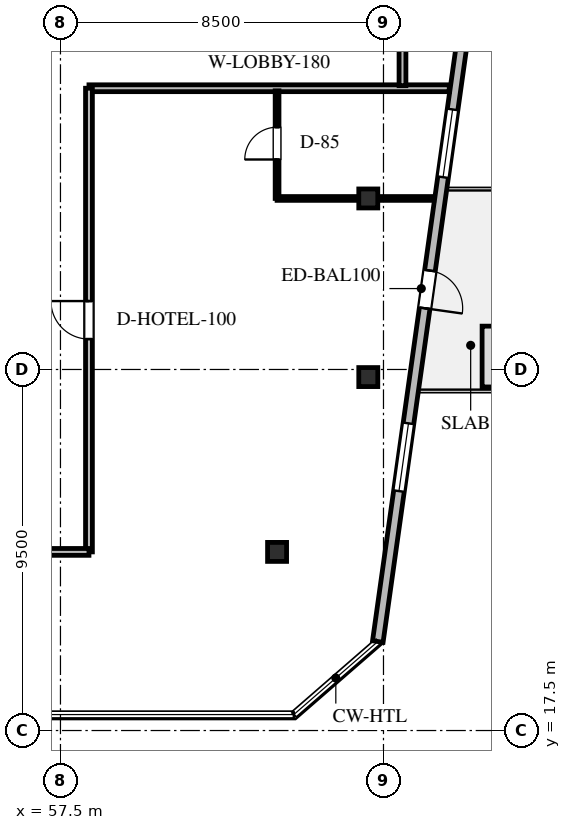
"""IFC4 building model, lengths in metres.
Left out: names, types, materials, properties, quantities, classifications, styles, units other than length and angle.
Written with IfcOpenShell. Run it as: python <this file> out.ifc"""

import sys

from ifc_helpers import new_model, si_unit, direction, frame, frame_2d, origin, origin_2d, place, context, subcontext, project, spatial, rectangle, hollow_rectangle, extrude, element, fill, save


model = new_model("IFC4")
c1 = context("Model", 3, precision=1e-05, world=origin(), true_north=direction((0.0, 1.0)))
c2 = subcontext(c1, "Body", "Model", "MODEL_VIEW")
j1 = project(units=[si_unit("LENGTHUNIT", "METRE"), si_unit("PLANEANGLEUNIT", "RADIAN")], contexts=[c1])
p1 = place(None, origin())
s1 = spatial("IfcSite", under=j1, at=p1, CompositionType="ELEMENT")
p2 = place(p1, origin())
s2 = spatial("IfcBuilding", under=s1, at=p2, CompositionType="ELEMENT")
p3 = place(p2, frame((0.0, 0.0, 249.0)))
s3 = spatial("IfcBuildingStorey", under=s2, at=p3, CompositionType="ELEMENT", Elevation=249.0)
for number, where, z_axis, x_axis in (
    (1, (65.6, 31.5, 0.0), (0.0, 0.0, 1.0), (1.0, 0.0, 0.0)),
    (2, (65.6, 26.8, 0.0), (0.0, 0.0, 1.0), (1.0, 0.0, 0.0)),
    (3, (63.2, 22.2, 0.0), (0.0, 0.0, 1.0), (1.0, 0.0, 0.0)),
):
    element("IfcColumn", number, at=place(p3, frame(where, z_axis=z_axis, x_axis=x_axis)), inside=s3, PredefinedType="COLUMN", context=c2, shape_type="SweptSolid", body=[
        extrude(hollow_rectangle(XDim=0.5, YDim=0.5, WallThickness=0.02, at=origin_2d()), origin(), (0.0, 0.0, 1.0), 3.6),
    ])
p4 = place(p3, frame((68.375, 37.8, 0.0), z_axis=(0.0, 0.0, 1.0), x_axis=(-0.13917438523, -0.990267888248, 0.0)))
e4 = element("IfcWall", 4, at=p4, inside=s3, PredefinedType="STANDARD", context=c2, shape_type="SweptSolid", body=[
    extrude(rectangle(XDim=18.135, YDim=0.28, at=frame_2d((9.067, 0.0))), origin(), (0.0, 0.0, 1.0), 3.36),
])
p5 = place(p4, frame((8.279, 0.0, 0.0)))
e5 = element("IfcOpeningElement", 5, at=p5, cuts=e4, PredefinedType="OPENING", context=c2, shape_type="SweptSolid", body=[
    extrude(rectangle(XDim=1.0, YDim=2.15, at=frame_2d((0.5, 1.075))), frame((0.0, 0.15, 0.0), z_axis=(0.0, -1.0, 0.0), x_axis=(1.0, 0.0, 0.0)), (0.0, 0.0, 1.0), 0.3),
])
p6 = place(p4, frame((3.997, 0.0, 0.65)))
e6 = element("IfcOpeningElement", 6, at=p6, cuts=e4, PredefinedType="OPENING", context=c2, shape_type="SweptSolid", body=[
    extrude(rectangle(XDim=1.8, YDim=2.1, at=frame_2d((0.9, 1.05))), frame((0.0, 0.15, 0.0), z_axis=(0.0, -1.0, 0.0), x_axis=(1.0, 0.0, 0.0)), (0.0, 0.0, 1.0), 0.3),
])
p7 = place(p4, frame((12.338, 0.0, 0.65)))
e7 = element("IfcOpeningElement", 7, at=p7, cuts=e4, PredefinedType="OPENING", context=c2, shape_type="SweptSolid", body=[
    extrude(rectangle(XDim=1.8, YDim=2.1, at=frame_2d((0.9, 1.05))), frame((0.0, 0.15, 0.0), z_axis=(0.0, -1.0, 0.0), x_axis=(1.0, 0.0, 0.0)), (0.0, 0.0, 1.0), 0.3),
])
p8 = place(p3, frame((58.25, 34.4, 0.0), z_axis=(0.0, 0.0, 1.0), x_axis=(1.0, 0.0, 0.0)))
e8 = element("IfcWall", 8, at=p8, inside=s3, PredefinedType="STANDARD", context=c2, shape_type="SweptSolid", body=[
    extrude(rectangle(XDim=9.48, YDim=0.18, at=frame_2d((4.74, 0.0))), origin(), (0.0, 0.0, 1.0), 3.36),
])
p9 = place(p3, frame((66.5, 34.468, 0.0), z_axis=(0.0, 0.0, 1.0), x_axis=(0.0, 1.0, 0.0)))
e9 = element("IfcWall", 9, at=p9, inside=s3, PredefinedType="STANDARD", context=c2, shape_type="SweptSolid", body=[
    extrude(rectangle(XDim=3.582, YDim=0.18, at=frame_2d((1.791, 0.0))), origin(), (0.0, 0.0, 1.0), 2.664),
])
p10 = place(p3, frame((58.25, 22.2, 0.0), z_axis=(0.0, 0.0, 1.0), x_axis=(0.0, 1.0, 0.0)))
e10 = element("IfcWall", 10, at=p10, inside=s3, PredefinedType="STANDARD", context=c2, shape_type="SweptSolid", body=[
    extrude(rectangle(XDim=12.2, YDim=0.18, at=frame_2d((6.1, 0.0))), origin(), (0.0, 0.0, 1.0), 2.664),
])
p11 = place(p10, frame((5.6, 0.0, 0.0)))
e11 = element("IfcOpeningElement", 11, at=p11, cuts=e10, PredefinedType="OPENING", context=c2, shape_type="SweptSolid", body=[
    extrude(rectangle(XDim=1.0, YDim=2.15, at=frame_2d((0.5, 1.075))), frame((0.0, 0.1, 0.0), z_axis=(0.0, -1.0, 0.0), x_axis=(1.0, 0.0, 0.0)), (0.0, 0.0, 1.0), 0.2),
])
p12 = place(p3, frame((56.0, 22.2, 0.0), z_axis=(0.0, 0.0, 1.0), x_axis=(1.0, 0.0, 0.0)))
e12 = element("IfcWall", 12, at=p12, inside=s3, PredefinedType="STANDARD", context=c2, shape_type="SweptSolid", body=[
    extrude(rectangle(XDim=2.25, YDim=0.18, at=frame_2d((1.125, 0.0))), origin(), (0.0, 0.0, 1.0), 2.664),
])
p13 = place(p3, frame((63.2, 31.5, 0.0), z_axis=(0.0, 0.0, 1.0), x_axis=(1.0, 0.0, 0.0)))
e13 = element("IfcWall", 13, at=p13, inside=s3, PredefinedType="PARTITIONING", context=c2, shape_type="SweptSolid", body=[
    extrude(rectangle(XDim=4.123, YDim=0.1, at=frame_2d((2.062, 0.0))), origin(), (0.0, 0.0, 1.0), 2.664),
])
p14 = place(p3, frame((63.2, 31.5, 0.0), z_axis=(0.0, 0.0, 1.0), x_axis=(0.0, 1.0, 0.0)))
e14 = element("IfcWall", 14, at=p14, inside=s3, PredefinedType="PARTITIONING", context=c2, shape_type="SweptSolid", body=[
    extrude(rectangle(XDim=2.832, YDim=0.1, at=frame_2d((1.416, 0.0))), origin(), (0.0, 0.0, 1.0), 2.664),
])
p15 = place(p14, frame((1.025, 0.0, 0.0)))
e15 = element("IfcOpeningElement", 15, at=p15, cuts=e14, PredefinedType="OPENING", context=c2, shape_type="SweptSolid", body=[
    extrude(rectangle(XDim=0.85, YDim=2.1, at=frame_2d((0.425, 1.05))), frame((0.0, 0.06, 0.0), z_axis=(0.0, -1.0, 0.0), x_axis=(1.0, 0.0, 0.0)), (0.0, 0.0, 1.0), 0.12),
])
p16 = place(p5, origin())
e16 = element("IfcDoor", 16, at=p16, inside=s3, OperationType="SINGLE_SWING_RIGHT", PredefinedType="DOOR", context=c2, shape_type="SweptSolid", body=[
    extrude(rectangle(XDim=1.0, YDim=2.15, at=frame_2d((0.5, 1.075))), frame((0.0, 0.025, 0.0), z_axis=(0.0, -1.0, 0.0), x_axis=(1.0, 0.0, 0.0)), (0.0, 0.0, 1.0), 0.05),
])
fill(e5, e16)
p17 = place(p6, origin())
e17 = element("IfcWindow", 17, at=p17, inside=s3, PartitioningType="SINGLE_PANEL", PredefinedType="WINDOW", context=c2, shape_type="SweptSolid", body=[
    extrude(rectangle(XDim=1.8, YDim=2.1, at=frame_2d((0.9, 1.05))), frame((0.0, 0.03, 0.0), z_axis=(0.0, -1.0, 0.0), x_axis=(1.0, 0.0, 0.0)), (0.0, 0.0, 1.0), 0.06),
])
fill(e6, e17)
p18 = place(p7, origin())
e18 = element("IfcWindow", 18, at=p18, inside=s3, PartitioningType="SINGLE_PANEL", PredefinedType="WINDOW", context=c2, shape_type="SweptSolid", body=[
    extrude(rectangle(XDim=1.8, YDim=2.1, at=frame_2d((0.9, 1.05))), frame((0.0, 0.03, 0.0), z_axis=(0.0, -1.0, 0.0), x_axis=(1.0, 0.0, 0.0)), (0.0, 0.0, 1.0), 0.06),
])
fill(e7, e18)
p19 = place(p11, origin())
e19 = element("IfcDoor", 19, at=p19, inside=s3, OperationType="SINGLE_SWING_RIGHT", PredefinedType="DOOR", context=c2, shape_type="SweptSolid", body=[
    extrude(rectangle(XDim=1.0, YDim=2.15, at=frame_2d((0.5, 1.075))), frame((0.0, 0.025, 0.0), z_axis=(0.0, -1.0, 0.0), x_axis=(1.0, 0.0, 0.0)), (0.0, 0.0, 1.0), 0.05),
])
fill(e11, e19)
p20 = place(p15, origin())
e20 = element("IfcDoor", 20, at=p20, inside=s3, OperationType="SINGLE_SWING_LEFT", PredefinedType="DOOR", context=c2, shape_type="SweptSolid", body=[
    extrude(rectangle(XDim=0.85, YDim=2.1, at=frame_2d((0.425, 1.05))), frame((0.0, 0.025, 0.0), z_axis=(0.0, -1.0, 0.0), x_axis=(1.0, 0.0, 0.0)), (0.0, 0.0, 1.0), 0.05),
])
fill(e15, e20)
save(model, sys.argv[1])
